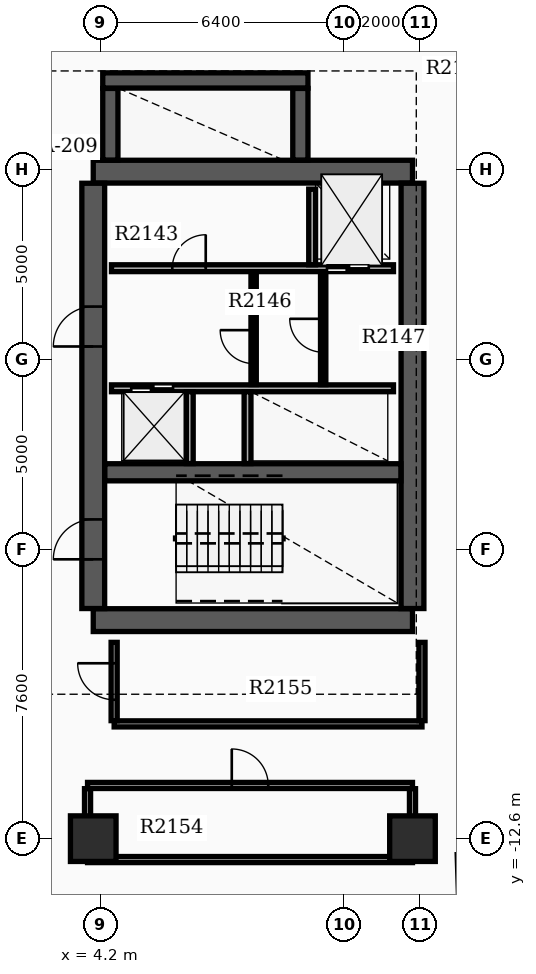
"""IFC4 building model, lengths in metres.
Left out: names, types, materials, properties, quantities, classifications, styles, units other than length and angle.
Written with IfcOpenShell. Run it as: python <this file> out.ifc"""

import sys

from ifc_helpers import new_model, si_unit, direction, frame, frame_2d, origin, origin_2d, place, context, subcontext, project, spatial, rectangle, extrude, element, fill, save


model = new_model("IFC4")
c1 = context("Model", 3, precision=1e-05, world=origin(), true_north=direction((0.0, 1.0)))
c2 = subcontext(c1, "Body", "Model", "MODEL_VIEW")
j1 = project(units=[si_unit("LENGTHUNIT", "METRE"), si_unit("PLANEANGLEUNIT", "RADIAN")], contexts=[c1])
p1 = place(None, origin())
s1 = spatial("IfcSite", under=j1, at=p1, CompositionType="ELEMENT")
p2 = place(p1, origin())
s2 = spatial("IfcBuilding", under=s1, at=p2, CompositionType="ELEMENT")
p3 = place(p2, frame((0.0, 0.0, 135.9)))
s3 = spatial("IfcBuildingStorey", under=s2, at=p3, CompositionType="ELEMENT", Elevation=135.9)
for number, where, z_axis, x_axis in (
    (1, (4.0, -6.85, 0.0), (0.0, 0.0, 1.0), (1.0, 0.0, 0.0)),
    (2, (4.0, 4.95, 0.0), (0.0, 0.0, 1.0), (1.0, 0.0, 0.0)),
):
    element("IfcWall", number, at=place(p3, frame(where, z_axis=z_axis, x_axis=x_axis)), inside=s3, PredefinedType="SHEAR", context=c2, shape_type="SweptSolid", body=[
        extrude(rectangle(XDim=8.4, YDim=0.6, at=frame_2d((4.2, 0.0))), origin(), (0.0, 0.0, 1.0), 3.7),
    ])
p4 = place(p3, frame((4.0, -6.545, 0.0), z_axis=(0.0, 0.0, 1.0), x_axis=(0.0, 1.0, 0.0)))
e3 = element("IfcWall", 3, at=p4, inside=s3, PredefinedType="SHEAR", context=c2, shape_type="SweptSolid", body=[
    extrude(rectangle(XDim=11.19, YDim=0.6, at=frame_2d((5.595, 0.0))), origin(), (0.0, 0.0, 1.0), 3.7),
])
p5 = place(p4, frame((1.295, 0.0, 0.0)))
e4 = element("IfcOpeningElement", 4, at=p5, cuts=e3, PredefinedType="OPENING", context=c2, shape_type="SweptSolid", body=[
    extrude(rectangle(XDim=1.05, YDim=2.15, at=frame_2d((0.525, 1.075))), frame((0.0, 0.31, 0.0), z_axis=(0.0, -1.0, 0.0), x_axis=(1.0, 0.0, 0.0)), (0.0, 0.0, 1.0), 0.62),
])
p6 = place(p4, frame((6.895, 0.0, 0.0)))
e5 = element("IfcOpeningElement", 5, at=p6, cuts=e3, PredefinedType="OPENING", context=c2, shape_type="SweptSolid", body=[
    extrude(rectangle(XDim=1.05, YDim=2.15, at=frame_2d((0.525, 1.075))), frame((0.0, 0.31, 0.0), z_axis=(0.0, -1.0, 0.0), x_axis=(1.0, 0.0, 0.0)), (0.0, 0.0, 1.0), 0.62),
])
p7 = place(p3, frame((12.4, -6.545, 0.0), z_axis=(0.0, 0.0, 1.0), x_axis=(0.0, 1.0, 0.0)))
e6 = element("IfcWall", 6, at=p7, inside=s3, PredefinedType="SHEAR", context=c2, shape_type="SweptSolid", body=[
    extrude(rectangle(XDim=11.19, YDim=0.6, at=frame_2d((5.595, 0.0))), origin(), (0.0, 0.0, 1.0), 3.7),
])
p8 = place(p3, frame((4.305, -2.96, 0.0), z_axis=(0.0, 0.0, 1.0), x_axis=(1.0, 0.0, 0.0)))
e7 = element("IfcWall", 7, at=p8, inside=s3, PredefinedType="SHEAR", context=c2, shape_type="SweptSolid", body=[
    extrude(rectangle(XDim=7.79, YDim=0.45, at=frame_2d((3.895, 0.0))), origin(), (0.0, 0.0, 1.0), 3.7),
])
p9 = place(p3, frame((4.45, 5.255, 0.0), z_axis=(0.0, 0.0, 1.0), x_axis=(0.0, 1.0, 0.0)))
e8 = element("IfcWall", 8, at=p9, inside=s3, PredefinedType="SHEAR", context=c2, shape_type="SweptSolid", body=[
    extrude(rectangle(XDim=1.885, YDim=0.4, at=frame_2d((0.942, 0.0))), origin(), (0.0, 0.0, 1.0), 3.7),
])
p10 = place(p3, frame((4.25, 7.35, 0.0), z_axis=(0.0, 0.0, 1.0), x_axis=(1.0, 0.0, 0.0)))
e9 = element("IfcWall", 9, at=p10, inside=s3, PredefinedType="SHEAR", context=c2, shape_type="SweptSolid", body=[
    extrude(rectangle(XDim=5.4, YDim=0.4, at=frame_2d((2.7, 0.0))), origin(), (0.0, 0.0, 1.0), 3.7),
])
p11 = place(p3, frame((9.45, 5.255, 0.0), z_axis=(0.0, 0.0, 1.0), x_axis=(0.0, 1.0, 0.0)))
e10 = element("IfcWall", 10, at=p11, inside=s3, PredefinedType="SHEAR", context=c2, shape_type="SweptSolid", body=[
    extrude(rectangle(XDim=1.885, YDim=0.4, at=frame_2d((0.942, 0.0))), origin(), (0.0, 0.0, 1.0), 3.7),
])
for number, where, z_axis, x_axis in (
    (11, (12.4, -12.6, 0.0), (0.0, 0.0, 1.0), (1.0, 0.0, 0.0)),
    (12, (4.0, -12.6, 0.0), (0.0, 0.0, 1.0), (1.0, 0.0, 0.0)),
):
    element("IfcColumn", number, at=place(p3, frame(where, z_axis=z_axis, x_axis=x_axis)), inside=s3, PredefinedType="COLUMN", context=c2, shape_type="SweptSolid", body=[
        extrude(rectangle(XDim=1.2, YDim=1.2, at=origin_2d()), origin(), (0.0, 0.0, 1.0), 3.9),
    ])
p12 = place(p3, frame((4.48, 2.41, 0.0), z_axis=(0.0, 0.0, 1.0), x_axis=(1.0, 0.0, 0.0)))
e13 = element("IfcWall", 13, at=p12, inside=s3, PredefinedType="SOLIDWALL", context=c2, shape_type="SweptSolid", body=[
    extrude(rectangle(XDim=7.42, YDim=0.18, at=frame_2d((3.71, 0.0))), origin(), (0.0, 0.0, 1.0), 2.96),
])
p13 = place(p12, frame((5.67, 0.0, 0.0)))
e14 = element("IfcOpeningElement", 14, at=p13, cuts=e13, PredefinedType="OPENING", context=c2, shape_type="SweptSolid", body=[
    extrude(rectangle(XDim=1.1, YDim=2.15, at=frame_2d((0.55, 1.075))), frame((0.0, 0.1, 0.0), z_axis=(0.0, -1.0, 0.0), x_axis=(1.0, 0.0, 0.0)), (0.0, 0.0, 1.0), 0.2),
])
p14 = place(p12, frame((1.6, 0.0, 0.0)))
e15 = element("IfcOpeningElement", 15, at=p14, cuts=e13, PredefinedType="OPENING", context=c2, shape_type="SweptSolid", body=[
    extrude(rectangle(XDim=0.88, YDim=2.1, at=frame_2d((0.44, 1.05))), frame((0.0, 0.1, 0.0), z_axis=(0.0, -1.0, 0.0), x_axis=(1.0, 0.0, 0.0)), (0.0, 0.0, 1.0), 0.2),
])
p15 = place(p3, frame((4.48, -0.75, 0.0), z_axis=(0.0, 0.0, 1.0), x_axis=(1.0, 0.0, 0.0)))
e16 = element("IfcWall", 16, at=p15, inside=s3, PredefinedType="SOLIDWALL", context=c2, shape_type="SweptSolid", body=[
    extrude(rectangle(XDim=7.42, YDim=0.18, at=frame_2d((3.71, 0.0))), origin(), (0.0, 0.0, 1.0), 2.96),
])
p16 = place(p15, frame((0.52, 0.0, 0.0)))
e17 = element("IfcOpeningElement", 17, at=p16, cuts=e16, PredefinedType="OPENING", context=c2, shape_type="SweptSolid", body=[
    extrude(rectangle(XDim=1.1, YDim=2.15, at=frame_2d((0.55, 1.075))), frame((0.0, 0.1, 0.0), z_axis=(0.0, -1.0, 0.0), x_axis=(1.0, 0.0, 0.0)), (0.0, 0.0, 1.0), 0.2),
])
p17 = place(p3, frame((9.76, 2.5, 0.0), z_axis=(0.0, 0.0, 1.0), x_axis=(0.0, 1.0, 0.0)))
e18 = element("IfcWall", 18, at=p17, inside=s3, PredefinedType="SOLIDWALL", context=c2, shape_type="SweptSolid", body=[
    extrude(rectangle(XDim=1.99, YDim=0.18, at=frame_2d((0.995, 0.0))), origin(), (0.0, 0.0, 1.0), 2.96),
])
for number, where, z_axis, x_axis in (
    (19, (6.54, -2.73, 0.0), (0.0, 0.0, 1.0), (0.0, 1.0, 0.0)),
    (20, (8.06, -2.73, 0.0), (0.0, 0.0, 1.0), (0.0, 1.0, 0.0)),
):
    element("IfcWall", number, at=place(p3, frame(where, z_axis=z_axis, x_axis=x_axis)), inside=s3, PredefinedType="SOLIDWALL", context=c2, shape_type="SweptSolid", body=[
        extrude(rectangle(XDim=1.89, YDim=0.18, at=frame_2d((0.945, 0.0))), origin(), (0.0, 0.0, 1.0), 2.96),
    ])
p18 = place(p3, frame((8.22, -0.65, 0.0), z_axis=(0.0, 0.0, 1.0), x_axis=(0.0, 1.0, 0.0)))
e21 = element("IfcWall", 21, at=p18, inside=s3, PredefinedType="SOLIDWALL", context=c2, shape_type="SweptSolid", body=[
    extrude(rectangle(XDim=2.96, YDim=0.14, at=frame_2d((1.48, 0.0))), origin(), (0.0, 0.0, 1.0), 2.96),
])
p19 = place(p18, frame((0.55, 0.0, 0.0)))
e22 = element("IfcOpeningElement", 22, at=p19, cuts=e21, PredefinedType="OPENING", context=c2, shape_type="SweptSolid", body=[
    extrude(rectangle(XDim=0.88, YDim=2.1, at=frame_2d((0.44, 1.05))), frame((0.0, 0.08, 0.0), z_axis=(0.0, -1.0, 0.0), x_axis=(1.0, 0.0, 0.0)), (0.0, 0.0, 1.0), 0.16),
])
p20 = place(p3, frame((10.05, -0.652, 0.0), z_axis=(0.0, 0.0, 1.0), x_axis=(0.0, 1.0, 0.0)))
e23 = element("IfcWall", 23, at=p20, inside=s3, PredefinedType="PARTITIONING", context=c2, shape_type="SweptSolid", body=[
    extrude(rectangle(XDim=2.962, YDim=0.14, at=frame_2d((1.481, 0.0))), origin(), (0.0, 0.0, 1.0), 2.96),
])
p21 = place(p20, frame((0.85, 0.0, 0.0)))
e24 = element("IfcOpeningElement", 24, at=p21, cuts=e23, PredefinedType="OPENING", context=c2, shape_type="SweptSolid", body=[
    extrude(rectangle(XDim=0.88, YDim=2.1, at=frame_2d((0.44, 1.05))), frame((0.0, 0.08, 0.0), z_axis=(0.0, -1.0, 0.0), x_axis=(1.0, 0.0, 0.0)), (0.0, 0.0, 1.0), 0.16),
])
p22 = place(p3, frame((3.85, -13.15, 0.0), z_axis=(0.0, 0.0, 1.0), x_axis=(1.0, 0.0, 0.0)))
e25 = element("IfcWall", 25, at=p22, inside=s3, PredefinedType="PARTITIONING", context=c2, shape_type="SweptSolid", body=[
    extrude(rectangle(XDim=8.55, YDim=0.16, at=frame_2d((4.275, 0.0))), origin(), (0.0, 0.0, 1.0), 2.96),
])
p23 = place(p3, frame((3.85, -11.2, 0.0), z_axis=(0.0, 0.0, 1.0), x_axis=(1.0, 0.0, 0.0)))
e26 = element("IfcWall", 26, at=p23, inside=s3, PredefinedType="PARTITIONING", context=c2, shape_type="SweptSolid", body=[
    extrude(rectangle(XDim=8.55, YDim=0.16, at=frame_2d((4.275, 0.0))), origin(), (0.0, 0.0, 1.0), 2.96),
])
p24 = place(p23, frame((3.795, 0.0, 0.0)))
e27 = element("IfcOpeningElement", 27, at=p24, cuts=e26, PredefinedType="OPENING", context=c2, shape_type="SweptSolid", body=[
    extrude(rectangle(XDim=0.96, YDim=2.15, at=frame_2d((0.48, 1.075))), frame((0.0, 0.09, 0.0), z_axis=(0.0, -1.0, 0.0), x_axis=(1.0, 0.0, 0.0)), (0.0, 0.0, 1.0), 0.18),
])
for number, where, z_axis, x_axis in (
    (28, (3.85, -13.065, 0.0), (0.0, 0.0, 1.0), (0.0, 1.0, 0.0)),
    (29, (12.4, -13.065, 0.0), (0.0, 0.0, 1.0), (0.0, 1.0, 0.0)),
):
    element("IfcWall", number, at=place(p3, frame(where, z_axis=z_axis, x_axis=x_axis)), inside=s3, PredefinedType="PARTITIONING", context=c2, shape_type="SweptSolid", body=[
        extrude(rectangle(XDim=1.78, YDim=0.16, at=frame_2d((0.89, 0.0))), origin(), (0.0, 0.0, 1.0), 2.96),
    ])
p25 = place(p3, frame((4.55, -9.58, 0.0), z_axis=(0.0, 0.0, 1.0), x_axis=(1.0, 0.0, 0.0)))
e30 = element("IfcWall", 30, at=p25, inside=s3, PredefinedType="PARTITIONING", context=c2, shape_type="SweptSolid", body=[
    extrude(rectangle(XDim=8.1, YDim=0.16, at=frame_2d((4.05, 0.0))), origin(), (0.0, 0.0, 1.0), 2.96),
])
p26 = place(p3, frame((4.55, -9.495, 0.0), z_axis=(0.0, 0.0, 1.0), x_axis=(0.0, 1.0, 0.0)))
e31 = element("IfcWall", 31, at=p26, inside=s3, PredefinedType="PARTITIONING", context=c2, shape_type="SweptSolid", body=[
    extrude(rectangle(XDim=2.06, YDim=0.16, at=frame_2d((1.03, 0.0))), origin(), (0.0, 0.0, 1.0), 2.96),
])
p27 = place(p26, frame((0.55, 0.0, 0.0)))
e32 = element("IfcOpeningElement", 32, at=p27, cuts=e31, PredefinedType="OPENING", context=c2, shape_type="SweptSolid", body=[
    extrude(rectangle(XDim=0.96, YDim=2.15, at=frame_2d((0.48, 1.075))), frame((0.0, 0.09, 0.0), z_axis=(0.0, -1.0, 0.0), x_axis=(1.0, 0.0, 0.0)), (0.0, 0.0, 1.0), 0.18),
])
p28 = place(p3, frame((12.65, -9.495, 0.0), z_axis=(0.0, 0.0, 1.0), x_axis=(0.0, 1.0, 0.0)))
e33 = element("IfcWall", 33, at=p28, inside=s3, PredefinedType="PARTITIONING", context=c2, shape_type="SweptSolid", body=[
    extrude(rectangle(XDim=2.06, YDim=0.16, at=frame_2d((1.03, 0.0))), origin(), (0.0, 0.0, 1.0), 2.96),
])
p29 = place(p5, origin())
e34 = element("IfcDoor", 34, at=p29, inside=s3, OperationType="SINGLE_SWING_LEFT", PredefinedType="DOOR", context=c2, shape_type="SweptSolid", body=[
    extrude(rectangle(XDim=1.05, YDim=2.15, at=frame_2d((0.525, 1.075))), frame((0.0, 0.025, 0.0), z_axis=(0.0, -1.0, 0.0), x_axis=(1.0, 0.0, 0.0)), (0.0, 0.0, 1.0), 0.05),
])
fill(e4, e34)
p30 = place(p6, origin())
e35 = element("IfcDoor", 35, at=p30, inside=s3, OperationType="SINGLE_SWING_LEFT", PredefinedType="DOOR", context=c2, shape_type="SweptSolid", body=[
    extrude(rectangle(XDim=1.05, YDim=2.15, at=frame_2d((0.525, 1.075))), frame((0.0, 0.025, 0.0), z_axis=(0.0, -1.0, 0.0), x_axis=(1.0, 0.0, 0.0)), (0.0, 0.0, 1.0), 0.05),
])
fill(e5, e35)
p31 = place(p13, origin())
e36 = element("IfcDoor", 36, at=p31, inside=s3, OperationType="DOUBLE_DOOR_SLIDING", PredefinedType="DOOR", context=c2, shape_type="SweptSolid", body=[
    extrude(rectangle(XDim=1.1, YDim=2.15, at=frame_2d((0.55, 1.075))), frame((0.0, 0.025, 0.0), z_axis=(0.0, -1.0, 0.0), x_axis=(1.0, 0.0, 0.0)), (0.0, 0.0, 1.0), 0.05),
])
fill(e14, e36)
p32 = place(p16, origin())
e37 = element("IfcDoor", 37, at=p32, inside=s3, OperationType="DOUBLE_DOOR_SLIDING", PredefinedType="DOOR", context=c2, shape_type="SweptSolid", body=[
    extrude(rectangle(XDim=1.1, YDim=2.15, at=frame_2d((0.55, 1.075))), frame((0.0, 0.025, 0.0), z_axis=(0.0, -1.0, 0.0), x_axis=(1.0, 0.0, 0.0)), (0.0, 0.0, 1.0), 0.05),
])
fill(e17, e37)
p33 = place(p14, origin())
e38 = element("IfcDoor", 38, at=p33, inside=s3, OperationType="SINGLE_SWING_RIGHT", PredefinedType="DOOR", context=c2, shape_type="SweptSolid", body=[
    extrude(rectangle(XDim=0.88, YDim=2.1, at=frame_2d((0.44, 1.05))), frame((0.0, 0.025, 0.0), z_axis=(0.0, -1.0, 0.0), x_axis=(1.0, 0.0, 0.0)), (0.0, 0.0, 1.0), 0.05),
])
fill(e15, e38)
p34 = place(p19, origin())
e39 = element("IfcDoor", 39, at=p34, inside=s3, OperationType="SINGLE_SWING_RIGHT", PredefinedType="DOOR", context=c2, shape_type="SweptSolid", body=[
    extrude(rectangle(XDim=0.88, YDim=2.1, at=frame_2d((0.44, 1.05))), frame((0.0, 0.025, 0.0), z_axis=(0.0, -1.0, 0.0), x_axis=(1.0, 0.0, 0.0)), (0.0, 0.0, 1.0), 0.05),
])
fill(e22, e39)
p35 = place(p21, origin())
e40 = element("IfcDoor", 40, at=p35, inside=s3, OperationType="SINGLE_SWING_RIGHT", PredefinedType="DOOR", context=c2, shape_type="SweptSolid", body=[
    extrude(rectangle(XDim=0.88, YDim=2.1, at=frame_2d((0.44, 1.05))), frame((0.0, 0.025, 0.0), z_axis=(0.0, -1.0, 0.0), x_axis=(1.0, 0.0, 0.0)), (0.0, 0.0, 1.0), 0.05),
])
fill(e24, e40)
p36 = place(p24, origin())
e41 = element("IfcDoor", 41, at=p36, inside=s3, OperationType="SINGLE_SWING_LEFT", PredefinedType="DOOR", context=c2, shape_type="SweptSolid", body=[
    extrude(rectangle(XDim=0.96, YDim=2.15, at=frame_2d((0.48, 1.075))), frame((0.0, 0.025, 0.0), z_axis=(0.0, -1.0, 0.0), x_axis=(1.0, 0.0, 0.0)), (0.0, 0.0, 1.0), 0.05),
])
fill(e27, e41)
p37 = place(p27, origin())
e42 = element("IfcDoor", 42, at=p37, inside=s3, OperationType="SINGLE_SWING_RIGHT", PredefinedType="DOOR", context=c2, shape_type="SweptSolid", body=[
    extrude(rectangle(XDim=0.96, YDim=2.15, at=frame_2d((0.48, 1.075))), frame((0.0, 0.025, 0.0), z_axis=(0.0, -1.0, 0.0), x_axis=(1.0, 0.0, 0.0)), (0.0, 0.0, 1.0), 0.05),
])
fill(e32, e42)
save(model, sys.argv[1])
